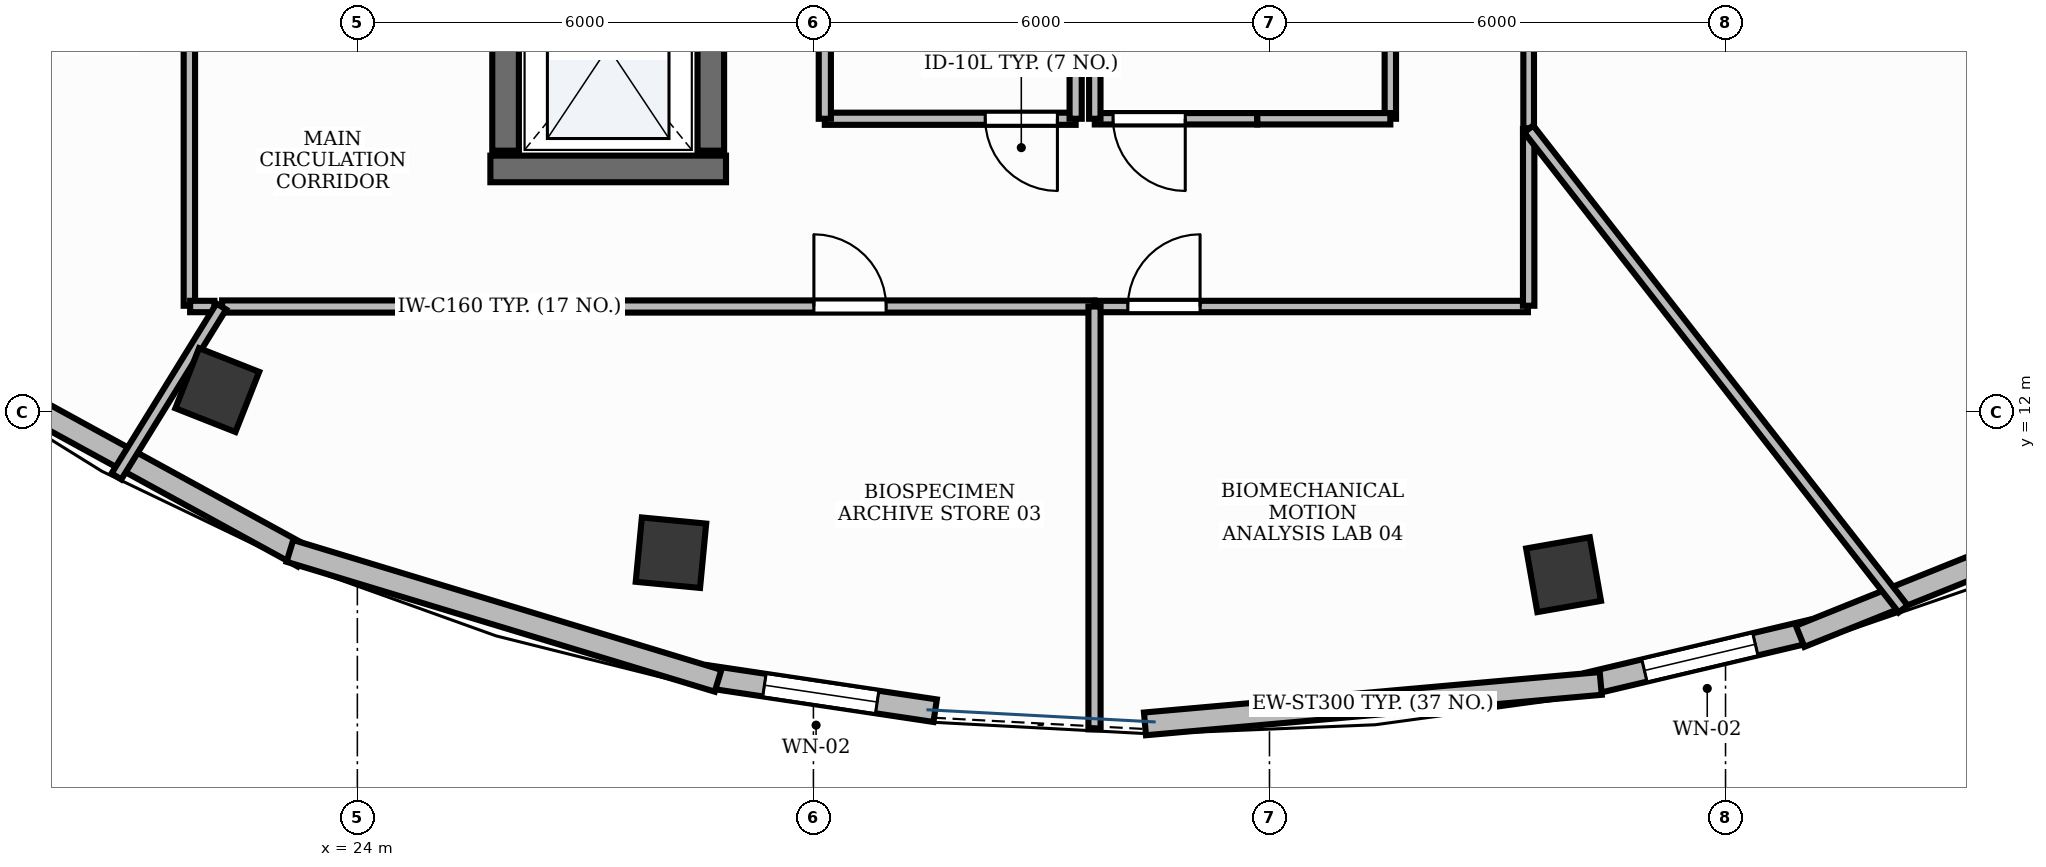
"""IFC4 building model, lengths in metres.
Left out: names, types, materials, properties, quantities, classifications, styles, units other than length and angle.
Written with IfcOpenShell. Run it as: python <this file> out.ifc"""

import sys

from ifc_helpers import new_model, si_unit, direction, frame, frame_2d, origin, origin_2d, place, context, subcontext, project, spatial, rectangle, extrude, element, fill, save


model = new_model("IFC4")
c1 = context("Model", 3, precision=1e-05, world=origin(), true_north=direction((0.0, 1.0)))
c2 = subcontext(c1, "Body", "Model", "MODEL_VIEW")
j1 = project(units=[si_unit("LENGTHUNIT", "METRE"), si_unit("PLANEANGLEUNIT", "RADIAN")], contexts=[c1])
p1 = place(None, origin())
s1 = spatial("IfcSite", under=j1, at=p1, CompositionType="ELEMENT")
p2 = place(p1, origin())
s2 = spatial("IfcBuilding", under=s1, at=p2, CompositionType="ELEMENT")
p3 = place(p2, frame((0.0, 0.0, 286.8)))
s3 = spatial("IfcBuildingStorey", under=s2, at=p3, CompositionType="ELEMENT", Elevation=286.8)
p4 = place(p3, frame((25.75, 15.2, 0.0), z_axis=(0.0, 0.0, 1.0), x_axis=(1.0, 0.0, 0.0)))
e1 = element("IfcWall", 1, at=p4, inside=s3, PredefinedType="SHEAR", context=c2, shape_type="SweptSolid", body=[
    extrude(rectangle(XDim=3.1, YDim=0.35, at=frame_2d((1.55, 0.0))), origin(), (0.0, 0.0, 1.0), 3.9),
])
for number, where, z_axis, x_axis in (
    (2, (25.95, 15.44, 0.0), (0.0, 0.0, 1.0), (0.0, 1.0, 0.0)),
    (3, (28.65, 15.44, 0.0), (0.0, 0.0, 1.0), (0.0, 1.0, 0.0)),
):
    element("IfcWall", number, at=place(p3, frame(where, z_axis=z_axis, x_axis=x_axis)), inside=s3, PredefinedType="SHEAR", context=c2, shape_type="SweptSolid", body=[
        extrude(rectangle(XDim=2.7, YDim=0.35, at=frame_2d((1.35, 0.0))), origin(), (0.0, 0.0, 1.0), 3.9),
    ])
for number, where, z_axis, x_axis in (
    (4, (22.157, 12.291, -0.0), (0.0, 0.0, 1.0), (-0.93, 0.367, 0.0)),
    (5, (28.126, 10.151, -0.0), (0.0, 0.0, 1.0), (-0.995, 0.095, 0.0)),
    (6, (39.869, 9.862, -0.0), (0.0, 0.0, 1.0), (0.985, 0.173, 0.0)),
):
    element("IfcColumn", number, at=place(p3, frame(where, z_axis=z_axis, x_axis=x_axis)), inside=s3, PredefinedType="COLUMN", context=c2, shape_type="SweptSolid", body=[
        extrude(rectangle(XDim=0.85, YDim=0.85, at=origin_2d()), origin(), (0.0, 0.0, 1.0), 3.901),
    ])
p5 = place(p3, frame((28.593, 8.523, 0.0), z_axis=(0.0, 0.0, 1.0), x_axis=(0.988992197506, -0.147967676446, 0.0)))
e7 = element("IfcWall", 7, at=p5, inside=s3, PredefinedType="STANDARD", context=c2, shape_type="SweptSolid", body=[
    extrude(rectangle(XDim=3.042, YDim=0.3, at=frame_2d((1.521, 0.0))), origin(), (0.0, 0.0, 1.0), 3.9),
])
p6 = place(p5, frame((0.771, 0.0, 0.95)))
e8 = element("IfcOpeningElement", 8, at=p6, cuts=e7, PredefinedType="OPENING", context=c2, shape_type="SweptSolid", body=[
    extrude(rectangle(XDim=1.5, YDim=1.8, at=frame_2d((0.75, 0.9))), frame((0.0, 0.165, 0.0), z_axis=(0.0, -1.0, 0.0), x_axis=(1.0, 0.0, 0.0)), (0.0, 0.0, 1.0), 0.33),
])
p7 = place(p3, frame((40.196, 8.427, 0.0), z_axis=(0.0, 0.0, 1.0), x_axis=(0.9731008332, 0.230379618079, 0.0)))
e9 = element("IfcWall", 9, at=p7, inside=s3, PredefinedType="STANDARD", context=c2, shape_type="SweptSolid", body=[
    extrude(rectangle(XDim=3.015, YDim=0.3, at=frame_2d((1.507, 0.0))), origin(), (0.0, 0.0, 1.0), 3.9),
])
p8 = place(p7, frame((0.758, 0.0, 0.95)))
e10 = element("IfcOpeningElement", 10, at=p8, cuts=e9, PredefinedType="OPENING", context=c2, shape_type="SweptSolid", body=[
    extrude(rectangle(XDim=1.5, YDim=1.8, at=frame_2d((0.75, 0.9))), frame((0.0, 0.165, 0.0), z_axis=(0.0, -1.0, 0.0), x_axis=(1.0, 0.0, 0.0)), (0.0, 0.0, 1.0), 0.33),
])
p9 = place(p3, frame((18.327, 12.818, 0.0), z_axis=(0.0, 0.0, 1.0), x_axis=(0.877062479499, -0.480376318166, 0.0)))
e11 = element("IfcWall", 11, at=p9, inside=s3, PredefinedType="STANDARD", context=c2, shape_type="SweptSolid", body=[
    extrude(rectangle(XDim=5.654, YDim=0.3, at=frame_2d((2.827, 0.0))), origin(), (0.0, 0.0, 1.0), 3.9),
])
p10 = place(p3, frame((23.113, 10.175, 0.0), z_axis=(0.0, 0.0, 1.0), x_axis=(0.95696124157, -0.290215751008, 0.0)))
e12 = element("IfcWall", 12, at=p10, inside=s3, PredefinedType="STANDARD", context=c2, shape_type="SweptSolid", body=[
    extrude(rectangle(XDim=5.886, YDim=0.3, at=frame_2d((2.943, 0.0))), origin(), (0.0, 0.0, 1.0), 3.9),
])
p11 = place(p3, frame((34.362, 7.899, 0.0), z_axis=(0.0, 0.0, 1.0), x_axis=(0.99608733171, 0.088374360578, 0.0)))
e13 = element("IfcWall", 13, at=p11, inside=s3, PredefinedType="STANDARD", context=c2, shape_type="SweptSolid", body=[
    extrude(rectangle(XDim=6.02, YDim=0.3, at=frame_2d((3.01, 0.0))), origin(), (0.0, 0.0, 1.0), 3.9),
])
p12 = place(p3, frame((42.981, 9.052, 0.0), z_axis=(0.0, 0.0, 1.0), x_axis=(0.927771967192, 0.373147660978, 0.0)))
e14 = element("IfcWall", 14, at=p12, inside=s3, PredefinedType="STANDARD", context=c2, shape_type="SweptSolid", body=[
    extrude(rectangle(XDim=5.796, YDim=0.3, at=frame_2d((2.898, 0.0))), origin(), (0.0, 0.0, 1.0), 3.9),
])
p13 = place(p3, frame((33.45, 15.86, 0.0), z_axis=(0.0, 0.0, 1.0), x_axis=(-1.0, 0.0, 0.0)))
e15 = element("IfcWall", 15, at=p13, inside=s3, PredefinedType="PARTITIONING", context=c2, shape_type="SweptSolid", body=[
    extrude(rectangle(XDim=3.3, YDim=0.16, at=frame_2d((1.65, 0.0))), origin(), (0.0, 0.0, 1.0), 2.22),
])
p14 = place(p13, frame((0.24, 0.0, 0.0)))
e16 = element("IfcOpeningElement", 16, at=p14, cuts=e15, PredefinedType="OPENING", context=c2, shape_type="SweptSolid", body=[
    extrude(rectangle(XDim=0.95, YDim=2.15, at=frame_2d((0.475, 1.075))), frame((0.0, 0.095, 0.0), z_axis=(0.0, -1.0, 0.0), x_axis=(1.0, 0.0, 0.0)), (0.0, 0.0, 1.0), 0.19),
])
p15 = place(p3, frame((22.22, 13.39, 0.0), z_axis=(0.0, 0.0, 1.0), x_axis=(1.0, 0.0, 0.0)))
e17 = element("IfcWall", 17, at=p15, inside=s3, PredefinedType="PARTITIONING", context=c2, shape_type="SweptSolid", body=[
    extrude(rectangle(XDim=11.478, YDim=0.16, at=frame_2d((5.739, 0.0))), origin(), (0.0, 0.0, 1.0), 2.22),
])
p16 = place(p15, frame((7.786, 0.0, 0.0)))
e18 = element("IfcOpeningElement", 18, at=p16, cuts=e17, PredefinedType="OPENING", context=c2, shape_type="SweptSolid", body=[
    extrude(rectangle(XDim=0.95, YDim=2.15, at=frame_2d((0.475, 1.075))), frame((0.0, 0.095, 0.0), z_axis=(0.0, -1.0, 0.0), x_axis=(1.0, 0.0, 0.0)), (0.0, 0.0, 1.0), 0.19),
])
p17 = place(p3, frame((33.708, 13.39, 0.0), z_axis=(0.0, 0.0, 1.0), x_axis=(1.0, 0.0, 0.0)))
e19 = element("IfcWall", 19, at=p17, inside=s3, PredefinedType="PARTITIONING", context=c2, shape_type="SweptSolid", body=[
    extrude(rectangle(XDim=5.692, YDim=0.15, at=frame_2d((2.846, 0.0))), origin(), (0.0, 0.0, 1.0), 2.22),
])
p18 = place(p17, frame((0.429, 0.0, 0.0)))
e20 = element("IfcOpeningElement", 20, at=p18, cuts=e19, PredefinedType="OPENING", context=c2, shape_type="SweptSolid", body=[
    extrude(rectangle(XDim=0.95, YDim=2.15, at=frame_2d((0.475, 1.075))), frame((0.0, 0.09, 0.0), z_axis=(0.0, -1.0, 0.0), x_axis=(1.0, 0.0, 0.0)), (0.0, 0.0, 1.0), 0.18),
])
p19 = place(p3, frame((35.84, 15.86, 0.0), z_axis=(0.0, 0.0, 1.0), x_axis=(-1.0, 0.0, 0.0)))
e21 = element("IfcWall", 21, at=p19, inside=s3, PredefinedType="PARTITIONING", context=c2, shape_type="SweptSolid", body=[
    extrude(rectangle(XDim=2.138, YDim=0.15, at=frame_2d((1.069, 0.0))), origin(), (0.0, 0.0, 1.0), 2.22),
])
p20 = place(p19, frame((0.948, 0.0, 0.0)))
e22 = element("IfcOpeningElement", 22, at=p20, cuts=e21, PredefinedType="OPENING", context=c2, shape_type="SweptSolid", body=[
    extrude(rectangle(XDim=0.95, YDim=2.15, at=frame_2d((0.475, 1.075))), frame((0.0, 0.09, 0.0), z_axis=(0.0, -1.0, 0.0), x_axis=(1.0, 0.0, 0.0)), (0.0, 0.0, 1.0), 0.18),
])
p21 = place(p3, frame((39.41, 15.736, 0.0), z_axis=(0.0, 0.0, 1.0), x_axis=(0.0, 1.0, 0.0)))
e23 = element("IfcWall", 23, at=p21, inside=s3, PredefinedType="PARTITIONING", context=c2, shape_type="SweptSolid", body=[
    extrude(rectangle(XDim=13.704, YDim=0.14, at=frame_2d((6.852, 0.0))), origin(), (0.0, 0.0, 1.0), 2.22),
])
p22 = place(p21, frame((5.533, 0.0, 0.0)))
e24 = element("IfcOpeningElement", 24, at=p22, cuts=e23, PredefinedType="OPENING", context=c2, shape_type="SweptSolid", body=[
    extrude(rectangle(XDim=0.95, YDim=2.15, at=frame_2d((0.475, 1.075))), frame((0.0, 0.085, 0.0), z_axis=(0.0, -1.0, 0.0), x_axis=(1.0, 0.0, 0.0)), (0.0, 0.0, 1.0), 0.17),
])
for number, where, z_axis, x_axis in (
    (25, (30.15, 15.86, 0.0), (0.0, 0.0, 1.0), (0.0, 1.0, 0.0)),
    (26, (33.45, 18.09, 0.0), (0.0, 0.0, 1.0), (0.0, -1.0, 0.0)),
):
    element("IfcWall", number, at=place(p3, frame(where, z_axis=z_axis, x_axis=x_axis)), inside=s3, PredefinedType="PARTITIONING", context=c2, shape_type="SweptSolid", body=[
        extrude(rectangle(XDim=2.23, YDim=0.16, at=frame_2d((1.115, 0.0))), origin(), (0.0, 0.0, 1.0), 2.22),
    ])
p23 = place(p3, frame((21.79, 19.34, 0.0), z_axis=(0.0, 0.0, 1.0), x_axis=(0.0, -1.0, 0.0)))
e27 = element("IfcWall", 27, at=p23, inside=s3, PredefinedType="PARTITIONING", context=c2, shape_type="SweptSolid", body=[
    extrude(rectangle(XDim=5.94, YDim=0.15, at=frame_2d((2.97, 0.0))), origin(), (0.0, 0.0, 1.0), 2.22),
])
p24 = place(p3, frame((21.8, 13.39, 0.0), z_axis=(0.0, 0.0, 1.0), x_axis=(1.0, 0.0, 0.0)))
e28 = element("IfcWall", 28, at=p24, inside=s3, PredefinedType="PARTITIONING", context=c2, shape_type="SweptSolid", body=[
    extrude(rectangle(XDim=0.319, YDim=0.15, at=frame_2d((0.159, 0.0))), origin(), (0.0, 0.0, 1.0), 2.22),
])
p25 = place(p3, frame((22.21, 13.39, 0.0), z_axis=(0.0, 0.0, 1.0), x_axis=(-0.525388006785, -0.850862763509, 0.0)))
e29 = element("IfcWall", 29, at=p25, inside=s3, PredefinedType="PARTITIONING", context=c2, shape_type="SweptSolid", body=[
    extrude(rectangle(XDim=2.627, YDim=0.15, at=frame_2d((1.313, 0.0))), origin(), (0.0, 0.0, 1.0), 2.22),
])
p26 = place(p3, frame((33.698, 13.39, 0.0), z_axis=(0.0, 0.0, 1.0), x_axis=(0.0, -1.0, 0.0)))
e30 = element("IfcWall", 30, at=p26, inside=s3, PredefinedType="PARTITIONING", context=c2, shape_type="SweptSolid", body=[
    extrude(rectangle(XDim=5.562, YDim=0.16, at=frame_2d((2.781, 0.0))), origin(), (0.0, 0.0, 1.0), 2.22),
])
p27 = place(p3, frame((39.41, 13.4, 0.0), z_axis=(0.0, 0.0, 1.0), x_axis=(0.0, 1.0, 0.0)))
e31 = element("IfcWall", 31, at=p27, inside=s3, PredefinedType="PARTITIONING", context=c2, shape_type="SweptSolid", body=[
    extrude(rectangle(XDim=2.326, YDim=0.15, at=frame_2d((1.163, 0.0))), origin(), (0.0, 0.0, 1.0), 2.22),
])
p28 = place(p3, frame((39.41, 15.726, 0.0), z_axis=(0.0, 0.0, 1.0), x_axis=(0.615180754192, -0.788386098096, 0.0)))
e32 = element("IfcWall", 32, at=p28, inside=s3, PredefinedType="PARTITIONING", context=c2, shape_type="SweptSolid", body=[
    extrude(rectangle(XDim=8.009, YDim=0.15, at=frame_2d((4.004, 0.0))), origin(), (0.0, 0.0, 1.0), 2.22),
])
p29 = place(p3, frame((37.59, 18.058, 0.0), z_axis=(0.0, 0.0, 1.0), x_axis=(0.0, -1.0, 0.0)))
e33 = element("IfcWall", 33, at=p29, inside=s3, PredefinedType="PARTITIONING", context=c2, shape_type="SweptSolid", body=[
    extrude(rectangle(XDim=2.198, YDim=0.15, at=frame_2d((1.099, 0.0))), origin(), (0.0, 0.0, 1.0), 2.22),
])
p30 = place(p3, frame((37.59, 15.86, 0.0), z_axis=(0.0, 0.0, 1.0), x_axis=(-1.0, 0.0, 0.0)))
e34 = element("IfcWall", 34, at=p30, inside=s3, PredefinedType="PARTITIONING", context=c2, shape_type="SweptSolid", body=[
    extrude(rectangle(XDim=1.75, YDim=0.15, at=frame_2d((0.875, 0.0))), origin(), (0.0, 0.0, 1.0), 2.22),
])
p31 = place(p3, frame((33.702, 15.86, 0.0), z_axis=(0.0, 0.0, 1.0), x_axis=(0.0, 1.0, 0.0)))
e35 = element("IfcWall", 35, at=p31, inside=s3, PredefinedType="PARTITIONING", context=c2, shape_type="SweptSolid", body=[
    extrude(rectangle(XDim=2.23, YDim=0.15, at=frame_2d((1.115, 0.0))), origin(), (0.0, 0.0, 1.0), 2.22),
])
p32 = place(p6, origin())
e36 = element("IfcWindow", 36, at=p32, inside=s3, PartitioningType="DOUBLE_PANEL_VERTICAL", PredefinedType="WINDOW", context=c2, shape_type="SweptSolid", body=[
    extrude(rectangle(XDim=1.5, YDim=1.8, at=frame_2d((0.75, 0.9))), frame((0.0, 0.03, 0.0), z_axis=(0.0, -1.0, 0.0), x_axis=(1.0, 0.0, 0.0)), (0.0, 0.0, 1.0), 0.06),
])
fill(e8, e36)
p33 = place(p8, origin())
e37 = element("IfcWindow", 37, at=p33, inside=s3, PartitioningType="DOUBLE_PANEL_VERTICAL", PredefinedType="WINDOW", context=c2, shape_type="SweptSolid", body=[
    extrude(rectangle(XDim=1.5, YDim=1.8, at=frame_2d((0.75, 0.9))), frame((0.0, 0.03, 0.0), z_axis=(0.0, -1.0, 0.0), x_axis=(1.0, 0.0, 0.0)), (0.0, 0.0, 1.0), 0.06),
])
fill(e10, e37)
p34 = place(p14, origin())
e38 = element("IfcDoor", 38, at=p34, inside=s3, OperationType="SINGLE_SWING_LEFT", PredefinedType="DOOR", context=c2, shape_type="SweptSolid", body=[
    extrude(rectangle(XDim=0.95, YDim=2.15, at=frame_2d((0.475, 1.075))), frame((0.0, 0.025, 0.0), z_axis=(0.0, -1.0, 0.0), x_axis=(1.0, 0.0, 0.0)), (0.0, 0.0, 1.0), 0.05),
])
fill(e16, e38)
p35 = place(p16, origin())
e39 = element("IfcDoor", 39, at=p35, inside=s3, OperationType="SINGLE_SWING_LEFT", PredefinedType="DOOR", context=c2, shape_type="SweptSolid", body=[
    extrude(rectangle(XDim=0.95, YDim=2.15, at=frame_2d((0.475, 1.075))), frame((0.0, 0.025, 0.0), z_axis=(0.0, -1.0, 0.0), x_axis=(1.0, 0.0, 0.0)), (0.0, 0.0, 1.0), 0.05),
])
fill(e18, e39)
p36 = place(p18, origin())
e40 = element("IfcDoor", 40, at=p36, inside=s3, OperationType="SINGLE_SWING_RIGHT", PredefinedType="DOOR", context=c2, shape_type="SweptSolid", body=[
    extrude(rectangle(XDim=0.95, YDim=2.15, at=frame_2d((0.475, 1.075))), frame((0.0, 0.025, 0.0), z_axis=(0.0, -1.0, 0.0), x_axis=(1.0, 0.0, 0.0)), (0.0, 0.0, 1.0), 0.05),
])
fill(e20, e40)
p37 = place(p20, origin())
e41 = element("IfcDoor", 41, at=p37, inside=s3, OperationType="SINGLE_SWING_LEFT", PredefinedType="DOOR", context=c2, shape_type="SweptSolid", body=[
    extrude(rectangle(XDim=0.95, YDim=2.15, at=frame_2d((0.475, 1.075))), frame((0.0, 0.025, 0.0), z_axis=(0.0, -1.0, 0.0), x_axis=(1.0, 0.0, 0.0)), (0.0, 0.0, 1.0), 0.05),
])
fill(e22, e41)
save(model, sys.argv[1])
